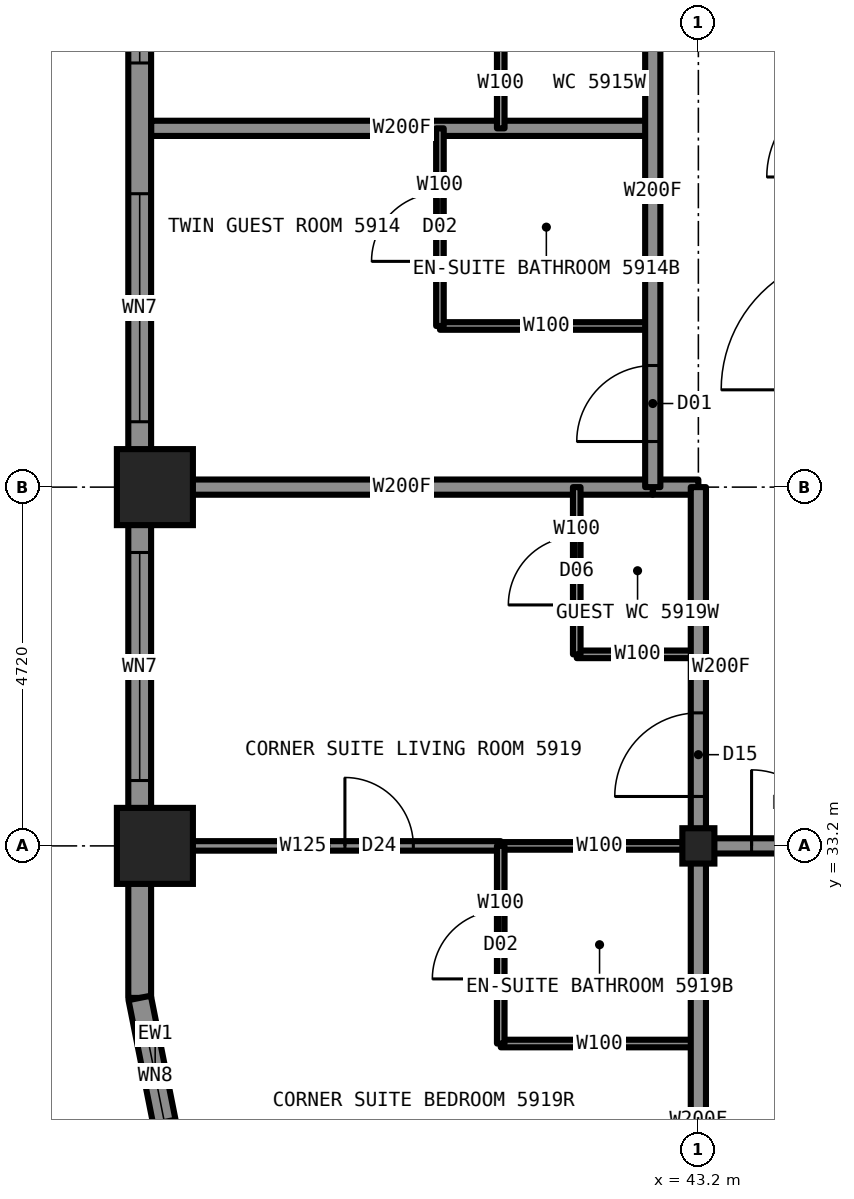
"""IFC4 building model, lengths in metres.
Left out: names, types, materials, properties, quantities, classifications, styles, units other than length and angle.
Written with IfcOpenShell. Run it as: python <this file> out.ifc"""

import sys

from ifc_helpers import new_model, si_unit, direction, frame, frame_2d, origin, origin_2d, place, context, subcontext, project, spatial, rectangle, i_section, extrude, element, fill, save


model = new_model("IFC4")
c1 = context("Model", 3, precision=1e-05, world=origin(), true_north=direction((0.0, 1.0)))
c2 = subcontext(c1, "Body", "Model", "MODEL_VIEW")
j1 = project(units=[si_unit("LENGTHUNIT", "METRE"), si_unit("PLANEANGLEUNIT", "RADIAN")], contexts=[c1])
p1 = place(None, origin())
s1 = spatial("IfcSite", under=j1, at=p1, CompositionType="ELEMENT")
p2 = place(p1, origin())
s2 = spatial("IfcBuilding", under=s1, at=p2, CompositionType="ELEMENT")
p3 = place(p2, frame((0.0, 0.0, 214.3)))
s3 = spatial("IfcBuildingStorey", under=s2, at=p3, CompositionType="ELEMENT", Elevation=214.3)
for number, where, z_axis, x_axis in (
    (1, (36.05, 33.2, 0.0), (0.0, 0.0, 1.0), (1.0, 0.0, 0.0)),
    (2, (36.05, 37.92, 0.0), (0.0, 0.0, 1.0), (1.0, 0.0, 0.0)),
):
    element("IfcColumn", number, at=place(p3, frame(where, z_axis=z_axis, x_axis=x_axis)), inside=s3, PredefinedType="COLUMN", context=c2, shape_type="SweptSolid", body=[
        extrude(i_section(OverallWidth=0.411, OverallDepth=0.434, WebThickness=0.036, FlangeThickness=0.057, at=origin_2d()), origin(), (0.0, 0.0, 1.0), 3.5),
    ])
p4 = place(p3, frame((43.2, 33.2, 0.0), z_axis=(0.0, 0.0, 1.0), x_axis=(1.0, 0.0, 0.0)))
e3 = element("IfcColumn", 3, at=p4, inside=s3, PredefinedType="COLUMN", context=c2, shape_type="SweptSolid", body=[
    extrude(i_section(OverallWidth=0.422, OverallDepth=0.465, WebThickness=0.045, FlangeThickness=0.073, at=origin_2d()), origin(), (0.0, 0.0, 1.0), 3.5),
])
p5 = place(p3, frame((40.6, 33.2, 0.0), z_axis=(0.0, 0.0, 1.0), x_axis=(1.0, 0.0, 0.0)))
e4 = element("IfcWall", 4, at=p5, inside=s3, PredefinedType="PARTITIONING", context=c2, shape_type="SweptSolid", body=[
    extrude(rectangle(XDim=2.6, YDim=0.1, at=frame_2d((1.3, 0.0))), origin(), (0.0, 0.0, 1.0), 2.573),
])
p6 = place(p3, frame((43.2, 33.2, 0.0), z_axis=(0.0, 0.0, 1.0), x_axis=(1.0, 0.0, 0.0)))
e5 = element("IfcWall", 5, at=p6, inside=s3, PredefinedType="PARTITIONING", context=c2, shape_type="SweptSolid", body=[
    extrude(rectangle(XDim=23.6, YDim=0.2, at=frame_2d((11.8, 0.0))), origin(), (0.0, 0.0, 1.0), 3.33),
])
p7 = place(p6, frame((0.7, 0.0, 0.0)))
e6 = element("IfcOpeningElement", 6, at=p7, cuts=e5, PredefinedType="OPENING", context=c2, shape_type="SweptSolid", body=[
    extrude(rectangle(XDim=1.0, YDim=2.2, at=frame_2d((0.5, 1.1))), frame((0.0, 0.11, 0.0), z_axis=(0.0, -1.0, 0.0), x_axis=(1.0, 0.0, 0.0)), (0.0, 0.0, 1.0), 0.22),
])
p8 = place(p6, frame((6.98, 0.0, 0.0)))
e7 = element("IfcOpeningElement", 7, at=p8, cuts=e5, PredefinedType="OPENING", context=c2, shape_type="SweptSolid", body=[
    extrude(rectangle(XDim=1.0, YDim=2.2, at=frame_2d((0.5, 1.1))), frame((0.0, 0.11, 0.0), z_axis=(0.0, -1.0, 0.0), x_axis=(1.0, 0.0, 0.0)), (0.0, 0.0, 1.0), 0.22),
])
p9 = place(p6, frame((9.84, 0.0, 0.0)))
e8 = element("IfcOpeningElement", 8, at=p9, cuts=e5, PredefinedType="OPENING", context=c2, shape_type="SweptSolid", body=[
    extrude(rectangle(XDim=1.0, YDim=2.2, at=frame_2d((0.5, 1.1))), frame((0.0, 0.11, 0.0), z_axis=(0.0, -1.0, 0.0), x_axis=(1.0, 0.0, 0.0)), (0.0, 0.0, 1.0), 0.22),
])
p10 = place(p6, frame((16.42, 0.0, 0.0)))
e9 = element("IfcOpeningElement", 9, at=p10, cuts=e5, PredefinedType="OPENING", context=c2, shape_type="SweptSolid", body=[
    extrude(rectangle(XDim=1.0, YDim=2.2, at=frame_2d((0.5, 1.1))), frame((0.0, 0.11, 0.0), z_axis=(0.0, -1.0, 0.0), x_axis=(1.0, 0.0, 0.0)), (0.0, 0.0, 1.0), 0.22),
])
p11 = place(p6, frame((19.28, 0.0, 0.0)))
e10 = element("IfcOpeningElement", 10, at=p11, cuts=e5, PredefinedType="OPENING", context=c2, shape_type="SweptSolid", body=[
    extrude(rectangle(XDim=1.0, YDim=2.2, at=frame_2d((0.5, 1.1))), frame((0.0, 0.11, 0.0), z_axis=(0.0, -1.0, 0.0), x_axis=(1.0, 0.0, 0.0)), (0.0, 0.0, 1.0), 0.22),
])
p12 = place(p3, frame((36.0, 33.2, 0.0), z_axis=(0.0, 0.0, 1.0), x_axis=(1.0, 0.0, 0.0)))
e11 = element("IfcWall", 11, at=p12, inside=s3, PredefinedType="PARTITIONING", context=c2, shape_type="SweptSolid", body=[
    extrude(rectangle(XDim=4.6, YDim=0.125, at=frame_2d((2.3, 0.0))), origin(), (0.0, 0.0, 1.0), 2.573),
])
p13 = place(p12, frame((2.55, 0.0, 0.0)))
e12 = element("IfcOpeningElement", 12, at=p13, cuts=e11, PredefinedType="OPENING", context=c2, shape_type="SweptSolid", body=[
    extrude(rectangle(XDim=0.9, YDim=2.2, at=frame_2d((0.45, 1.1))), frame((0.0, 0.073, 0.0), z_axis=(0.0, -1.0, 0.0), x_axis=(1.0, 0.0, 0.0)), (0.0, 0.0, 1.0), 0.145),
])
p14 = place(p3, frame((40.6, 30.6, 0.0), z_axis=(0.0, 0.0, 1.0), x_axis=(1.0, 0.0, 0.0)))
e13 = element("IfcWall", 13, at=p14, inside=s3, PredefinedType="PARTITIONING", context=c2, shape_type="SweptSolid", body=[
    extrude(rectangle(XDim=2.6, YDim=0.1, at=frame_2d((1.3, 0.0))), origin(), (0.0, 0.0, 1.0), 3.33),
])
p15 = place(p3, frame((36.0, 42.64, 0.0), z_axis=(0.0, 0.0, 1.0), x_axis=(1.0, 0.0, 0.0)))
e14 = element("IfcWall", 14, at=p15, inside=s3, PredefinedType="PARTITIONING", context=c2, shape_type="SweptSolid", body=[
    extrude(rectangle(XDim=6.6, YDim=0.2, at=frame_2d((3.3, 0.0))), origin(), (0.0, 0.0, 1.0), 2.73),
])
p16 = place(p3, frame((39.8, 40.04, 0.0), z_axis=(0.0, 0.0, 1.0), x_axis=(1.0, 0.0, 0.0)))
e15 = element("IfcWall", 15, at=p16, inside=s3, PredefinedType="PARTITIONING", context=c2, shape_type="SweptSolid", body=[
    extrude(rectangle(XDim=2.8, YDim=0.1, at=frame_2d((1.4, 0.0))), origin(), (0.0, 0.0, 1.0), 3.33),
])
p17 = place(p3, frame((42.6, 37.92, 0.0), z_axis=(0.0, 0.0, 1.0), x_axis=(1.0, 0.0, 0.0)))
e16 = element("IfcWall", 16, at=p17, inside=s3, PredefinedType="PARTITIONING", context=c2, shape_type="SweptSolid", body=[
    extrude(rectangle(XDim=0.6, YDim=0.2, at=frame_2d((0.3, 0.0))), origin(), (0.0, 0.0, 1.0), 2.573),
])
p18 = place(p3, frame((36.0, 37.92, 0.0), z_axis=(0.0, 0.0, 1.0), x_axis=(1.0, 0.0, 0.0)))
e17 = element("IfcWall", 17, at=p18, inside=s3, PredefinedType="PARTITIONING", context=c2, shape_type="SweptSolid", body=[
    extrude(rectangle(XDim=6.6, YDim=0.2, at=frame_2d((3.3, 0.0))), origin(), (0.0, 0.0, 1.0), 2.573),
])
p19 = place(p3, frame((41.6, 35.72, 0.0), z_axis=(0.0, 0.0, 1.0), x_axis=(1.0, 0.0, 0.0)))
e18 = element("IfcWall", 18, at=p19, inside=s3, PredefinedType="PARTITIONING", context=c2, shape_type="SweptSolid", body=[
    extrude(rectangle(XDim=1.6, YDim=0.1, at=frame_2d((0.8, 0.0))), origin(), (0.0, 0.0, 1.0), 3.33),
])
p20 = place(p3, frame((43.2, 33.2, 0.0), z_axis=(0.0, 0.0, 1.0), x_axis=(0.0, 1.0, 0.0)))
e19 = element("IfcWall", 19, at=p20, inside=s3, PredefinedType="PARTITIONING", context=c2, shape_type="SweptSolid", body=[
    extrude(rectangle(XDim=4.72, YDim=0.2, at=frame_2d((2.36, 0.0))), origin(), (0.0, 0.0, 1.0), 3.33),
])
p21 = place(p20, frame((0.65, 0.0, 0.0)))
e20 = element("IfcOpeningElement", 20, at=p21, cuts=e19, PredefinedType="OPENING", context=c2, shape_type="SweptSolid", body=[
    extrude(rectangle(XDim=1.1, YDim=2.2, at=frame_2d((0.55, 1.1))), frame((0.0, 0.11, 0.0), z_axis=(0.0, -1.0, 0.0), x_axis=(1.0, 0.0, 0.0)), (0.0, 0.0, 1.0), 0.22),
])
p22 = place(p3, frame((43.2, 26.0, 0.0), z_axis=(0.0, 0.0, 1.0), x_axis=(0.0, 1.0, 0.0)))
e21 = element("IfcWall", 21, at=p22, inside=s3, PredefinedType="PARTITIONING", context=c2, shape_type="SweptSolid", body=[
    extrude(rectangle(XDim=7.2, YDim=0.2, at=frame_2d((3.6, 0.0))), origin(), (0.0, 0.0, 1.0), 2.573),
])
p23 = place(p3, frame((42.6, 37.92, 0.0), z_axis=(0.0, 0.0, 1.0), x_axis=(0.0, 1.0, 0.0)))
e22 = element("IfcWall", 22, at=p23, inside=s3, PredefinedType="PARTITIONING", context=c2, shape_type="SweptSolid", body=[
    extrude(rectangle(XDim=14.16, YDim=0.2, at=frame_2d((7.08, 0.0))), origin(), (0.0, 0.0, 1.0), 3.33),
])
p24 = place(p23, frame((0.4, 0.0, 0.0)))
e23 = element("IfcOpeningElement", 23, at=p24, cuts=e22, PredefinedType="OPENING", context=c2, shape_type="SweptSolid", body=[
    extrude(rectangle(XDim=1.0, YDim=2.2, at=frame_2d((0.5, 1.1))), frame((0.0, 0.11, 0.0), z_axis=(0.0, -1.0, 0.0), x_axis=(1.0, 0.0, 0.0)), (0.0, 0.0, 1.0), 0.22),
])
p25 = place(p23, frame((6.18, 0.0, 0.0)))
e24 = element("IfcOpeningElement", 24, at=p25, cuts=e22, PredefinedType="OPENING", context=c2, shape_type="SweptSolid", body=[
    extrude(rectangle(XDim=1.0, YDim=2.2, at=frame_2d((0.5, 1.1))), frame((0.0, 0.11, 0.0), z_axis=(0.0, -1.0, 0.0), x_axis=(1.0, 0.0, 0.0)), (0.0, 0.0, 1.0), 0.22),
])
p26 = place(p23, frame((11.7, 0.0, 0.0)))
e25 = element("IfcOpeningElement", 25, at=p26, cuts=e22, PredefinedType="OPENING", context=c2, shape_type="SweptSolid", body=[
    extrude(rectangle(XDim=1.0, YDim=2.2, at=frame_2d((0.5, 1.1))), frame((0.0, 0.11, 0.0), z_axis=(0.0, -1.0, 0.0), x_axis=(1.0, 0.0, 0.0)), (0.0, 0.0, 1.0), 0.22),
])
p27 = place(p3, frame((41.6, 35.72, 0.0), z_axis=(0.0, 0.0, 1.0), x_axis=(0.0, 1.0, 0.0)))
e26 = element("IfcWall", 26, at=p27, inside=s3, PredefinedType="PARTITIONING", context=c2, shape_type="SweptSolid", body=[
    extrude(rectangle(XDim=2.2, YDim=0.1, at=frame_2d((1.1, 0.0))), origin(), (0.0, 0.0, 1.0), 3.33),
])
p28 = place(p27, frame((0.65, 0.0, 0.0)))
e27 = element("IfcOpeningElement", 27, at=p28, cuts=e26, PredefinedType="OPENING", context=c2, shape_type="SweptSolid", body=[
    extrude(rectangle(XDim=0.9, YDim=2.1, at=frame_2d((0.45, 1.05))), frame((0.0, 0.06, 0.0), z_axis=(0.0, -1.0, 0.0), x_axis=(1.0, 0.0, 0.0)), (0.0, 0.0, 1.0), 0.12),
])
p29 = place(p3, frame((40.6, 30.6, 0.0), z_axis=(0.0, 0.0, 1.0), x_axis=(0.0, 1.0, 0.0)))
e28 = element("IfcWall", 28, at=p29, inside=s3, PredefinedType="PARTITIONING", context=c2, shape_type="SweptSolid", body=[
    extrude(rectangle(XDim=2.6, YDim=0.1, at=frame_2d((1.3, 0.0))), origin(), (0.0, 0.0, 1.0), 3.33),
])
p30 = place(p29, frame((0.85, 0.0, 0.0)))
e29 = element("IfcOpeningElement", 29, at=p30, cuts=e28, PredefinedType="OPENING", context=c2, shape_type="SweptSolid", body=[
    extrude(rectangle(XDim=0.9, YDim=2.1, at=frame_2d((0.45, 1.05))), frame((0.0, 0.06, 0.0), z_axis=(0.0, -1.0, 0.0), x_axis=(1.0, 0.0, 0.0)), (0.0, 0.0, 1.0), 0.12),
])
p31 = place(p3, frame((40.6, 42.64, 0.0), z_axis=(0.0, 0.0, 1.0), x_axis=(0.0, 1.0, 0.0)))
e30 = element("IfcWall", 30, at=p31, inside=s3, PredefinedType="PARTITIONING", context=c2, shape_type="SweptSolid", body=[
    extrude(rectangle(XDim=1.2, YDim=0.1, at=frame_2d((0.6, 0.0))), origin(), (0.0, 0.0, 1.0), 3.33),
])
p32 = place(p3, frame((39.8, 40.04, 0.0), z_axis=(0.0, 0.0, 1.0), x_axis=(0.0, 1.0, 0.0)))
e31 = element("IfcWall", 31, at=p32, inside=s3, PredefinedType="PARTITIONING", context=c2, shape_type="SweptSolid", body=[
    extrude(rectangle(XDim=2.6, YDim=0.1, at=frame_2d((1.3, 0.0))), origin(), (0.0, 0.0, 1.0), 3.33),
])
p33 = place(p32, frame((0.85, 0.0, 0.0)))
e32 = element("IfcOpeningElement", 32, at=p33, cuts=e31, PredefinedType="OPENING", context=c2, shape_type="SweptSolid", body=[
    extrude(rectangle(XDim=0.9, YDim=2.1, at=frame_2d((0.45, 1.05))), frame((0.0, 0.06, 0.0), z_axis=(0.0, -1.0, 0.0), x_axis=(1.0, 0.0, 0.0)), (0.0, 0.0, 1.0), 0.12),
])
p34 = place(p3, frame((35.85, 58.8, 0.0), z_axis=(0.0, 0.0, 1.0), x_axis=(0.0, -1.0, 0.0)))
e33 = element("IfcWall", 33, at=p34, inside=s3, PredefinedType="SOLIDWALL", context=c2, shape_type="SweptSolid", body=[
    extrude(rectangle(XDim=27.6, YDim=0.3, at=frame_2d((13.8, 0.0))), origin(), (0.0, 0.0, 1.0), 2.63),
])
p35 = place(p34, frame((2.86, 0.0, 0.3)))
e34 = element("IfcOpeningElement", 34, at=p35, cuts=e33, PredefinedType="OPENING", context=c2, shape_type="SweptSolid", body=[
    extrude(rectangle(XDim=3.0, YDim=2.0, at=frame_2d((1.5, 1.0))), frame((0.0, 0.16, 0.0), z_axis=(0.0, -1.0, 0.0), x_axis=(1.0, 0.0, 0.0)), (0.0, 0.0, 1.0), 0.32),
])
p36 = place(p34, frame((7.58, 0.0, 0.3)))
e35 = element("IfcOpeningElement", 35, at=p36, cuts=e33, PredefinedType="OPENING", context=c2, shape_type="SweptSolid", body=[
    extrude(rectangle(XDim=3.0, YDim=2.0, at=frame_2d((1.5, 1.0))), frame((0.0, 0.16, 0.0), z_axis=(0.0, -1.0, 0.0), x_axis=(1.0, 0.0, 0.0)), (0.0, 0.0, 1.0), 0.32),
])
p37 = place(p34, frame((12.3, 0.0, 0.3)))
e36 = element("IfcOpeningElement", 36, at=p37, cuts=e33, PredefinedType="OPENING", context=c2, shape_type="SweptSolid", body=[
    extrude(rectangle(XDim=3.0, YDim=2.0, at=frame_2d((1.5, 1.0))), frame((0.0, 0.16, 0.0), z_axis=(0.0, -1.0, 0.0), x_axis=(1.0, 0.0, 0.0)), (0.0, 0.0, 1.0), 0.32),
])
p38 = place(p34, frame((17.02, 0.0, 0.3)))
e37 = element("IfcOpeningElement", 37, at=p38, cuts=e33, PredefinedType="OPENING", context=c2, shape_type="SweptSolid", body=[
    extrude(rectangle(XDim=3.0, YDim=2.0, at=frame_2d((1.5, 1.0))), frame((0.0, 0.16, 0.0), z_axis=(0.0, -1.0, 0.0), x_axis=(1.0, 0.0, 0.0)), (0.0, 0.0, 1.0), 0.32),
])
p39 = place(p34, frame((21.74, 0.0, 0.3)))
e38 = element("IfcOpeningElement", 38, at=p39, cuts=e33, PredefinedType="OPENING", context=c2, shape_type="SweptSolid", body=[
    extrude(rectangle(XDim=3.0, YDim=2.0, at=frame_2d((1.5, 1.0))), frame((0.0, 0.16, 0.0), z_axis=(0.0, -1.0, 0.0), x_axis=(1.0, 0.0, 0.0)), (0.0, 0.0, 1.0), 0.32),
])
p40 = place(p3, frame((35.85, 31.2, 0.0), z_axis=(0.0, 0.0, 1.0), x_axis=(0.195081421501, -0.980787050784, 0.0)))
e39 = element("IfcWall", 39, at=p40, inside=s3, PredefinedType="SOLIDWALL", context=c2, shape_type="SweptSolid", body=[
    extrude(rectangle(XDim=2.087, YDim=0.3, at=frame_2d((1.044, 0.0))), origin(), (0.0, 0.0, 1.0), 3.33),
])
p41 = place(p40, frame((0.444, 0.0, 1.3)))
e40 = element("IfcOpeningElement", 40, at=p41, cuts=e39, PredefinedType="OPENING", context=c2, shape_type="SweptSolid", body=[
    extrude(rectangle(XDim=0.6, YDim=1.0, at=frame_2d((0.3, 0.5))), frame((0.0, 0.16, 0.0), z_axis=(0.0, -1.0, 0.0), x_axis=(1.0, 0.0, 0.0)), (0.0, 0.0, 1.0), 0.32),
])
p42 = place(p7, origin())
e41 = element("IfcDoor", 41, at=p42, inside=s3, OperationType="SINGLE_SWING_LEFT", PredefinedType="DOOR", context=c2, shape_type="SweptSolid", body=[
    extrude(rectangle(XDim=1.0, YDim=2.2, at=frame_2d((0.5, 1.1))), frame((0.0, 0.025, 0.0), z_axis=(0.0, -1.0, 0.0), x_axis=(1.0, 0.0, 0.0)), (0.0, 0.0, 1.0), 0.05),
])
fill(e6, e41)
p43 = place(p24, origin())
e42 = element("IfcDoor", 42, at=p43, inside=s3, OperationType="SINGLE_SWING_LEFT", PredefinedType="DOOR", context=c2, shape_type="SweptSolid", body=[
    extrude(rectangle(XDim=1.0, YDim=2.2, at=frame_2d((0.5, 1.1))), frame((0.0, 0.025, 0.0), z_axis=(0.0, -1.0, 0.0), x_axis=(1.0, 0.0, 0.0)), (0.0, 0.0, 1.0), 0.05),
])
fill(e23, e42)
p44 = place(p33, origin())
e43 = element("IfcDoor", 43, at=p44, inside=s3, OperationType="SINGLE_SWING_RIGHT", PredefinedType="DOOR", context=c2, shape_type="SweptSolid", body=[
    extrude(rectangle(XDim=0.9, YDim=2.1, at=frame_2d((0.45, 1.05))), frame((0.0, 0.025, 0.0), z_axis=(0.0, -1.0, 0.0), x_axis=(1.0, 0.0, 0.0)), (0.0, 0.0, 1.0), 0.05),
])
fill(e32, e43)
p45 = place(p21, origin())
e44 = element("IfcDoor", 44, at=p45, inside=s3, OperationType="SINGLE_SWING_LEFT", PredefinedType="DOOR", context=c2, shape_type="SweptSolid", body=[
    extrude(rectangle(XDim=1.1, YDim=2.2, at=frame_2d((0.55, 1.1))), frame((0.0, 0.025, 0.0), z_axis=(0.0, -1.0, 0.0), x_axis=(1.0, 0.0, 0.0)), (0.0, 0.0, 1.0), 0.05),
])
fill(e20, e44)
p46 = place(p30, origin())
e45 = element("IfcDoor", 45, at=p46, inside=s3, OperationType="SINGLE_SWING_RIGHT", PredefinedType="DOOR", context=c2, shape_type="SweptSolid", body=[
    extrude(rectangle(XDim=0.9, YDim=2.1, at=frame_2d((0.45, 1.05))), frame((0.0, 0.025, 0.0), z_axis=(0.0, -1.0, 0.0), x_axis=(1.0, 0.0, 0.0)), (0.0, 0.0, 1.0), 0.05),
])
fill(e29, e45)
p47 = place(p13, origin())
e46 = element("IfcDoor", 46, at=p47, inside=s3, OperationType="SINGLE_SWING_LEFT", PredefinedType="DOOR", context=c2, shape_type="SweptSolid", body=[
    extrude(rectangle(XDim=0.9, YDim=2.2, at=frame_2d((0.45, 1.1))), frame((0.0, 0.025, 0.0), z_axis=(0.0, -1.0, 0.0), x_axis=(1.0, 0.0, 0.0)), (0.0, 0.0, 1.0), 0.05),
])
fill(e12, e46)
p48 = place(p28, origin())
e47 = element("IfcDoor", 47, at=p48, inside=s3, OperationType="SINGLE_SWING_LEFT", PredefinedType="DOOR", context=c2, shape_type="SweptSolid", body=[
    extrude(rectangle(XDim=0.9, YDim=2.1, at=frame_2d((0.45, 1.05))), frame((0.0, 0.025, 0.0), z_axis=(0.0, -1.0, 0.0), x_axis=(1.0, 0.0, 0.0)), (0.0, 0.0, 1.0), 0.05),
])
fill(e27, e47)
p49 = place(p37, origin())
e48 = element("IfcWindow", 48, at=p49, inside=s3, PartitioningType="SINGLE_PANEL", PredefinedType="WINDOW", context=c2, shape_type="SweptSolid", body=[
    extrude(rectangle(XDim=3.0, YDim=2.0, at=frame_2d((1.5, 1.0))), frame((0.0, 0.13, 0.0), z_axis=(0.0, -1.0, 0.0), x_axis=(1.0, 0.0, 0.0)), (0.0, 0.0, 1.0), 0.06),
])
fill(e36, e48)
p50 = place(p38, origin())
e49 = element("IfcWindow", 49, at=p50, inside=s3, PartitioningType="SINGLE_PANEL", PredefinedType="WINDOW", context=c2, shape_type="SweptSolid", body=[
    extrude(rectangle(XDim=3.0, YDim=2.0, at=frame_2d((1.5, 1.0))), frame((0.0, 0.13, 0.0), z_axis=(0.0, -1.0, 0.0), x_axis=(1.0, 0.0, 0.0)), (0.0, 0.0, 1.0), 0.06),
])
fill(e37, e49)
p51 = place(p39, origin())
e50 = element("IfcWindow", 50, at=p51, inside=s3, PartitioningType="SINGLE_PANEL", PredefinedType="WINDOW", context=c2, shape_type="SweptSolid", body=[
    extrude(rectangle(XDim=3.0, YDim=2.0, at=frame_2d((1.5, 1.0))), frame((0.0, 0.13, 0.0), z_axis=(0.0, -1.0, 0.0), x_axis=(1.0, 0.0, 0.0)), (0.0, 0.0, 1.0), 0.06),
])
fill(e38, e50)
p52 = place(p41, origin())
e51 = element("IfcWindow", 51, at=p52, inside=s3, PartitioningType="SINGLE_PANEL", PredefinedType="WINDOW", context=c2, shape_type="SweptSolid", body=[
    extrude(rectangle(XDim=0.6, YDim=1.0, at=frame_2d((0.3, 0.5))), frame((0.0, 0.13, 0.0), z_axis=(0.0, -1.0, 0.0), x_axis=(1.0, 0.0, 0.0)), (0.0, 0.0, 1.0), 0.06),
])
fill(e40, e51)
save(model, sys.argv[1])
